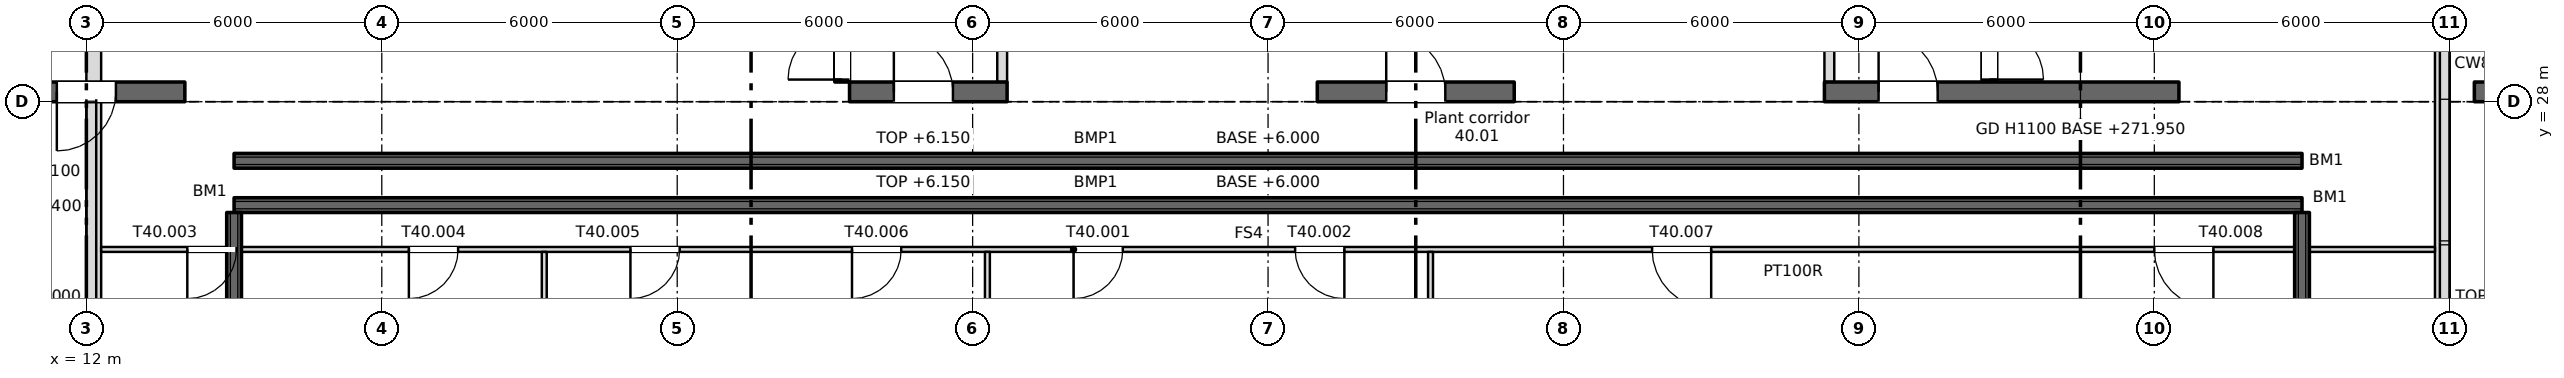
"""IFC4 building model, lengths in metres.
Left out: names, types, materials, properties, quantities, classifications, styles, units other than length and angle.
Written with IfcOpenShell. Run it as: python <this file> out.ifc"""

import sys

from ifc_helpers import new_model, si_unit, direction, frame, frame_2d, origin, place, context, subcontext, project, spatial, rectangle, extrude, element, fill, save


model = new_model("IFC4")
c1 = context("Model", 3, precision=1e-05, world=origin(), true_north=direction((0.0, 1.0)))
c2 = subcontext(c1, "Body", "Model", "MODEL_VIEW")
j1 = project(units=[si_unit("LENGTHUNIT", "METRE"), si_unit("PLANEANGLEUNIT", "RADIAN")], contexts=[c1])
p1 = place(None, origin())
s1 = spatial("IfcSite", under=j1, at=p1, CompositionType="ELEMENT")
p2 = place(p1, origin())
s2 = spatial("IfcBuilding", under=s1, at=p2, CompositionType="ELEMENT")
p3 = place(p2, frame((0.0, 0.0, 271.95)))
s3 = spatial("IfcBuildingStorey", under=s2, at=p3, CompositionType="ELEMENT", Elevation=271.95)
for number, where, z_axis, x_axis in (
    (1, (12.15, 6.3, 6.0), (0.0, 0.0, 1.0), (0.0, 1.0, 0.0)),
    (2, (59.85, 6.3, 6.0), (0.0, 0.0, 1.0), (0.0, 1.0, 0.0)),
):
    element("IfcWall", number, at=place(p3, frame(where, z_axis=z_axis, x_axis=x_axis)), inside=s3, PredefinedType="PARAPET", context=c2, shape_type="SweptSolid", body=[
        extrude(rectangle(XDim=30.4, YDim=0.3, at=frame_2d((15.2, 0.0))), origin(), (0.0, 0.0, 1.0), 1.1),
    ])
for number, where, z_axis, x_axis in (
    (3, (15.0, 26.8, 6.0), (0.0, 0.0, 1.0), (1.0, 0.0, 0.0)),
    (4, (15.0, 25.9, 6.0), (0.0, 0.0, 1.0), (1.0, 0.0, 0.0)),
):
    element("IfcWall", number, at=place(p3, frame(where, z_axis=z_axis, x_axis=x_axis)), inside=s3, PredefinedType="SOLIDWALL", context=c2, shape_type="SweptSolid", body=[
        extrude(rectangle(XDim=42.0, YDim=0.3, at=frame_2d((21.0, 0.0))), origin(), (0.0, 0.0, 1.0), 0.15),
    ])
for number, where, z_axis, x_axis in (
    (5, (15.0, 8.55, 6.0), (0.0, 0.0, 1.0), (0.0, 1.0, 0.0)),
    (6, (57.0, 8.55, 6.0), (0.0, 0.0, 1.0), (0.0, 1.0, 0.0)),
):
    element("IfcWall", number, at=place(p3, frame(where, z_axis=z_axis, x_axis=x_axis)), inside=s3, PredefinedType="SOLIDWALL", context=c2, shape_type="SweptSolid", body=[
        extrude(rectangle(XDim=17.2, YDim=0.3, at=frame_2d((8.6, 0.0))), origin(), (0.0, 0.0, 1.0), 0.15),
    ])
p4 = place(p3, frame((13.85, 28.4, 0.0), z_axis=(0.0, 0.0, 1.0), x_axis=(0.0, 1.0, 0.0)))
e7 = element("IfcWall", 7, at=p4, inside=s3, PredefinedType="SHEAR", context=c2, shape_type="SweptSolid", body=[
    extrude(rectangle(XDim=6.1, YDim=0.3, at=frame_2d((3.05, 0.0))), origin(), (0.0, 0.0, 1.0), 5.5),
])
p5 = place(p3, frame((10.0, 28.2, 0.0), z_axis=(0.0, 0.0, 1.0), x_axis=(1.0, 0.0, 0.0)))
e8 = element("IfcWall", 8, at=p5, inside=s3, PredefinedType="SHEAR", context=c2, shape_type="SweptSolid", body=[
    extrude(rectangle(XDim=4.0, YDim=0.4, at=frame_2d((2.0, 0.0))), origin(), (0.0, 0.0, 1.0), 5.5),
])
p6 = place(p5, frame((1.4, 0.0, 0.0)))
e9 = element("IfcOpeningElement", 9, at=p6, cuts=e8, PredefinedType="OPENING", context=c2, shape_type="SweptSolid", body=[
    extrude(rectangle(XDim=1.2, YDim=2.1, at=frame_2d((0.6, 1.05))), frame((0.0, 0.21, 0.0), z_axis=(0.0, -1.0, 0.0), x_axis=(1.0, 0.0, 0.0)), (0.0, 0.0, 1.0), 0.42),
])
p7 = place(p3, frame((23.65, 28.4, 0.0), z_axis=(0.0, 0.0, 1.0), x_axis=(0.0, 1.0, 0.0)))
e10 = element("IfcWall", 10, at=p7, inside=s3, PredefinedType="SHEAR", context=c2, shape_type="SweptSolid", body=[
    extrude(rectangle(XDim=6.1, YDim=0.3, at=frame_2d((3.05, 0.0))), origin(), (0.0, 0.0, 1.0), 6.0),
])
p8 = place(p3, frame((27.35, 28.4, 0.0), z_axis=(0.0, 0.0, 1.0), x_axis=(0.0, 1.0, 0.0)))
e11 = element("IfcWall", 11, at=p8, inside=s3, PredefinedType="SHEAR", context=c2, shape_type="SweptSolid", body=[
    extrude(rectangle(XDim=6.1, YDim=0.3, at=frame_2d((3.05, 0.0))), origin(), (0.0, 0.0, 1.0), 6.0),
])
p9 = place(p8, frame((0.05, 0.0, 0.0)))
e12 = element("IfcOpeningElement", 12, at=p9, cuts=e11, PredefinedType="OPENING", context=c2, shape_type="SweptSolid", body=[
    extrude(rectangle(XDim=1.1, YDim=2.1, at=frame_2d((0.55, 1.05))), frame((0.0, 0.16, 0.0), z_axis=(0.0, -1.0, 0.0), x_axis=(1.0, 0.0, 0.0)), (0.0, 0.0, 1.0), 0.32),
])
p10 = place(p3, frame((23.5, 28.2, 0.0), z_axis=(0.0, 0.0, 1.0), x_axis=(1.0, 0.0, 0.0)))
e13 = element("IfcWall", 13, at=p10, inside=s3, PredefinedType="SHEAR", context=c2, shape_type="SweptSolid", body=[
    extrude(rectangle(XDim=4.0, YDim=0.4, at=frame_2d((2.0, 0.0))), origin(), (0.0, 0.0, 1.0), 6.0),
])
p11 = place(p3, frame((27.5, 28.2, 0.0), z_axis=(0.0, 0.0, 1.0), x_axis=(1.0, 0.0, 0.0)))
e14 = element("IfcWall", 14, at=p11, inside=s3, PredefinedType="SHEAR", context=c2, shape_type="SweptSolid", body=[
    extrude(rectangle(XDim=3.2, YDim=0.4, at=frame_2d((1.6, 0.0))), origin(), (0.0, 0.0, 1.0), 5.5),
])
p12 = place(p11, frame((0.9, 0.0, 0.0)))
e15 = element("IfcOpeningElement", 15, at=p12, cuts=e14, PredefinedType="OPENING", context=c2, shape_type="SweptSolid", body=[
    extrude(rectangle(XDim=1.2, YDim=2.1, at=frame_2d((0.6, 1.05))), frame((0.0, 0.21, 0.0), z_axis=(0.0, -1.0, 0.0), x_axis=(1.0, 0.0, 0.0)), (0.0, 0.0, 1.0), 0.42),
])
for number, where, z_axis, x_axis in (
    (16, (37.15, 28.4, 0.0), (0.0, 0.0, 1.0), (0.0, 1.0, 0.0)),
    (17, (40.85, 28.4, 0.0), (0.0, 0.0, 1.0), (0.0, 1.0, 0.0)),
):
    element("IfcWall", number, at=place(p3, frame(where, z_axis=z_axis, x_axis=x_axis)), inside=s3, PredefinedType="SHEAR", context=c2, shape_type="SweptSolid", body=[
        extrude(rectangle(XDim=6.1, YDim=0.3, at=frame_2d((3.05, 0.0))), origin(), (0.0, 0.0, 1.0), 6.0),
    ])
p13 = place(p3, frame((37.0, 28.2, 0.0), z_axis=(0.0, 0.0, 1.0), x_axis=(1.0, 0.0, 0.0)))
e18 = element("IfcWall", 18, at=p13, inside=s3, PredefinedType="SHEAR", context=c2, shape_type="SweptSolid", body=[
    extrude(rectangle(XDim=4.0, YDim=0.4, at=frame_2d((2.0, 0.0))), origin(), (0.0, 0.0, 1.0), 6.0),
])
p14 = place(p13, frame((1.4, 0.0, 0.0)))
e19 = element("IfcOpeningElement", 19, at=p14, cuts=e18, PredefinedType="OPENING", context=c2, shape_type="SweptSolid", body=[
    extrude(rectangle(XDim=1.2, YDim=2.1, at=frame_2d((0.6, 1.05))), frame((0.0, 0.21, 0.0), z_axis=(0.0, -1.0, 0.0), x_axis=(1.0, 0.0, 0.0)), (0.0, 0.0, 1.0), 0.42),
])
p15 = place(p3, frame((50.65, 34.5, 0.0), z_axis=(0.0, 0.0, 1.0), x_axis=(0.0, -1.0, 0.0)))
e20 = element("IfcWall", 20, at=p15, inside=s3, PredefinedType="SHEAR", context=c2, shape_type="SweptSolid", body=[
    extrude(rectangle(XDim=6.1, YDim=0.3, at=frame_2d((3.05, 0.0))), origin(), (0.0, 0.0, 1.0), 5.5),
])
p16 = place(p15, frame((4.95, 0.0, 0.0)))
e21 = element("IfcOpeningElement", 21, at=p16, cuts=e20, PredefinedType="OPENING", context=c2, shape_type="SweptSolid", body=[
    extrude(rectangle(XDim=1.1, YDim=2.1, at=frame_2d((0.55, 1.05))), frame((0.0, 0.16, 0.0), z_axis=(0.0, -1.0, 0.0), x_axis=(1.0, 0.0, 0.0)), (0.0, 0.0, 1.0), 0.32),
])
p17 = place(p3, frame((54.35, 28.4, 0.0), z_axis=(0.0, 0.0, 1.0), x_axis=(0.0, 1.0, 0.0)))
e22 = element("IfcWall", 22, at=p17, inside=s3, PredefinedType="SHEAR", context=c2, shape_type="SweptSolid", body=[
    extrude(rectangle(XDim=6.1, YDim=0.3, at=frame_2d((3.05, 0.0))), origin(), (0.0, 0.0, 1.0), 5.5),
])
p18 = place(p3, frame((47.3, 28.2, 0.0), z_axis=(0.0, 0.0, 1.0), x_axis=(1.0, 0.0, 0.0)))
e23 = element("IfcWall", 23, at=p18, inside=s3, PredefinedType="SHEAR", context=c2, shape_type="SweptSolid", body=[
    extrude(rectangle(XDim=7.2, YDim=0.4, at=frame_2d((3.6, 0.0))), origin(), (0.0, 0.0, 1.0), 5.5),
])
p19 = place(p18, frame((1.1, 0.0, 0.0)))
e24 = element("IfcOpeningElement", 24, at=p19, cuts=e23, PredefinedType="OPENING", context=c2, shape_type="SweptSolid", body=[
    extrude(rectangle(XDim=1.2, YDim=2.1, at=frame_2d((0.6, 1.05))), frame((0.0, 0.21, 0.0), z_axis=(0.0, -1.0, 0.0), x_axis=(1.0, 0.0, 0.0)), (0.0, 0.0, 1.0), 0.42),
])
p20 = place(p3, frame((60.65, 28.4, 0.0), z_axis=(0.0, 0.0, 1.0), x_axis=(0.0, 1.0, 0.0)))
e25 = element("IfcWall", 25, at=p20, inside=s3, PredefinedType="SHEAR", context=c2, shape_type="SweptSolid", body=[
    extrude(rectangle(XDim=6.1, YDim=0.3, at=frame_2d((3.05, 0.0))), origin(), (0.0, 0.0, 1.0), 5.2),
])
p21 = place(p3, frame((60.5, 28.2, 0.0), z_axis=(0.0, 0.0, 1.0), x_axis=(1.0, 0.0, 0.0)))
e26 = element("IfcWall", 26, at=p21, inside=s3, PredefinedType="SHEAR", context=c2, shape_type="SweptSolid", body=[
    extrude(rectangle(XDim=4.0, YDim=0.4, at=frame_2d((2.0, 0.0))), origin(), (0.0, 0.0, 1.0), 5.2),
])
p22 = place(p21, frame((1.4, 0.0, 0.0)))
e27 = element("IfcOpeningElement", 27, at=p22, cuts=e26, PredefinedType="OPENING", context=c2, shape_type="SweptSolid", body=[
    extrude(rectangle(XDim=1.2, YDim=2.1, at=frame_2d((0.6, 1.05))), frame((0.0, 0.21, 0.0), z_axis=(0.0, -1.0, 0.0), x_axis=(1.0, 0.0, 0.0)), (0.0, 0.0, 1.0), 0.42),
])
for number, where, z_axis, x_axis in (
    (28, (30.6, 28.4, 0.0), (0.0, 0.0, 1.0), (0.0, 1.0, 0.0)),
    (29, (47.4, 28.4, 0.0), (0.0, 0.0, 1.0), (0.0, 1.0, 0.0)),
):
    element("IfcWall", number, at=place(p3, frame(where, z_axis=z_axis, x_axis=x_axis)), inside=s3, PredefinedType="PARTITIONING", context=c2, shape_type="SweptSolid", body=[
        extrude(rectangle(XDim=6.1, YDim=0.2, at=frame_2d((3.05, 0.0))), origin(), (0.0, 0.0, 1.0), 5.5),
    ])
p23 = place(p3, frame((12.3, 25.0, 0.0), z_axis=(0.0, 0.0, 1.0), x_axis=(1.0, 0.0, 0.0)))
e30 = element("IfcWall", 30, at=p23, inside=s3, PredefinedType="PARTITIONING", context=c2, shape_type="SweptSolid", body=[
    extrude(rectangle(XDim=47.4, YDim=0.1, at=frame_2d((23.7, 0.0))), origin(), (0.0, 0.0, 1.0), 5.4),
])
p24 = place(p23, frame((19.75, 0.0, 0.0)))
e31 = element("IfcOpeningElement", 31, at=p24, cuts=e30, PredefinedType="OPENING", context=c2, shape_type="SweptSolid", body=[
    extrude(rectangle(XDim=1.0, YDim=2.1, at=frame_2d((0.5, 1.05))), frame((0.0, 0.06, 0.0), z_axis=(0.0, -1.0, 0.0), x_axis=(1.0, 0.0, 0.0)), (0.0, 0.0, 1.0), 0.12),
])
p25 = place(p23, frame((24.25, 0.0, 0.0)))
e32 = element("IfcOpeningElement", 32, at=p25, cuts=e30, PredefinedType="OPENING", context=c2, shape_type="SweptSolid", body=[
    extrude(rectangle(XDim=1.0, YDim=2.1, at=frame_2d((0.5, 1.05))), frame((0.0, 0.06, 0.0), z_axis=(0.0, -1.0, 0.0), x_axis=(1.0, 0.0, 0.0)), (0.0, 0.0, 1.0), 0.12),
])
p26 = place(p23, frame((1.75, 0.0, 0.0)))
e33 = element("IfcOpeningElement", 33, at=p26, cuts=e30, PredefinedType="OPENING", context=c2, shape_type="SweptSolid", body=[
    extrude(rectangle(XDim=1.0, YDim=2.1, at=frame_2d((0.5, 1.05))), frame((0.0, 0.06, 0.0), z_axis=(0.0, -1.0, 0.0), x_axis=(1.0, 0.0, 0.0)), (0.0, 0.0, 1.0), 0.12),
])
p27 = place(p23, frame((6.25, 0.0, 0.0)))
e34 = element("IfcOpeningElement", 34, at=p27, cuts=e30, PredefinedType="OPENING", context=c2, shape_type="SweptSolid", body=[
    extrude(rectangle(XDim=1.0, YDim=2.1, at=frame_2d((0.5, 1.05))), frame((0.0, 0.06, 0.0), z_axis=(0.0, -1.0, 0.0), x_axis=(1.0, 0.0, 0.0)), (0.0, 0.0, 1.0), 0.12),
])
p28 = place(p23, frame((10.75, 0.0, 0.0)))
e35 = element("IfcOpeningElement", 35, at=p28, cuts=e30, PredefinedType="OPENING", context=c2, shape_type="SweptSolid", body=[
    extrude(rectangle(XDim=1.0, YDim=2.1, at=frame_2d((0.5, 1.05))), frame((0.0, 0.06, 0.0), z_axis=(0.0, -1.0, 0.0), x_axis=(1.0, 0.0, 0.0)), (0.0, 0.0, 1.0), 0.12),
])
p29 = place(p23, frame((15.25, 0.0, 0.0)))
e36 = element("IfcOpeningElement", 36, at=p29, cuts=e30, PredefinedType="OPENING", context=c2, shape_type="SweptSolid", body=[
    extrude(rectangle(XDim=1.0, YDim=2.1, at=frame_2d((0.5, 1.05))), frame((0.0, 0.06, 0.0), z_axis=(0.0, -1.0, 0.0), x_axis=(1.0, 0.0, 0.0)), (0.0, 0.0, 1.0), 0.12),
])
p30 = place(p23, frame((31.5, 0.0, 0.0)))
e37 = element("IfcOpeningElement", 37, at=p30, cuts=e30, PredefinedType="OPENING", context=c2, shape_type="SweptSolid", body=[
    extrude(rectangle(XDim=1.2, YDim=2.1, at=frame_2d((0.6, 1.05))), frame((0.0, 0.06, 0.0), z_axis=(0.0, -1.0, 0.0), x_axis=(1.0, 0.0, 0.0)), (0.0, 0.0, 1.0), 0.12),
])
p31 = place(p23, frame((41.7, 0.0, 0.0)))
e38 = element("IfcOpeningElement", 38, at=p31, cuts=e30, PredefinedType="OPENING", context=c2, shape_type="SweptSolid", body=[
    extrude(rectangle(XDim=1.2, YDim=2.1, at=frame_2d((0.6, 1.05))), frame((0.0, 0.06, 0.0), z_axis=(0.0, -1.0, 0.0), x_axis=(1.0, 0.0, 0.0)), (0.0, 0.0, 1.0), 0.12),
])
p32 = place(p3, frame((21.3, 6.3, 0.0), z_axis=(0.0, 0.0, 1.0), x_axis=(0.0, 1.0, 0.0)))
e39 = element("IfcWall", 39, at=p32, inside=s3, PredefinedType="PARTITIONING", context=c2, shape_type="SweptSolid", body=[
    extrude(rectangle(XDim=18.65, YDim=0.1, at=frame_2d((9.325, 0.0))), origin(), (0.0, 0.0, 1.0), 5.4),
])
p33 = place(p3, frame((30.3, 19.4, 0.0), z_axis=(0.0, 0.0, 1.0), x_axis=(0.0, 1.0, 0.0)))
e40 = element("IfcWall", 40, at=p33, inside=s3, PredefinedType="PARTITIONING", context=c2, shape_type="SweptSolid", body=[
    extrude(rectangle(XDim=5.55, YDim=0.1, at=frame_2d((2.775, 0.0))), origin(), (0.0, 0.0, 1.0), 5.4),
])
p34 = place(p3, frame((39.3, 6.3, 0.0), z_axis=(0.0, 0.0, 1.0), x_axis=(0.0, 1.0, 0.0)))
e41 = element("IfcWall", 41, at=p34, inside=s3, PredefinedType="PARTITIONING", context=c2, shape_type="SweptSolid", body=[
    extrude(rectangle(XDim=18.65, YDim=0.1, at=frame_2d((9.325, 0.0))), origin(), (0.0, 0.0, 1.0), 5.4),
])
p35 = place(p6, frame((1.2, 0.0, 0.0), z_axis=(0.0, 0.0, 1.0), x_axis=(-1.0, 0.0, 0.0)))
e42 = element("IfcDoor", 42, at=p35, inside=s3, OperationType="SINGLE_SWING_RIGHT", PredefinedType="DOOR", context=c2, shape_type="SweptSolid", body=[
    extrude(rectangle(XDim=1.2, YDim=2.1, at=frame_2d((0.6, 1.05))), frame((0.0, 0.025, 0.0), z_axis=(0.0, -1.0, 0.0), x_axis=(1.0, 0.0, 0.0)), (0.0, 0.0, 1.0), 0.05),
])
fill(e9, e42)
p36 = place(p9, origin())
e43 = element("IfcDoor", 43, at=p36, inside=s3, OperationType="SINGLE_SWING_LEFT", PredefinedType="DOOR", context=c2, shape_type="SweptSolid", body=[
    extrude(rectangle(XDim=1.1, YDim=2.1, at=frame_2d((0.55, 1.05))), frame((0.0, 0.025, 0.0), z_axis=(0.0, -1.0, 0.0), x_axis=(1.0, 0.0, 0.0)), (0.0, 0.0, 1.0), 0.05),
])
fill(e12, e43)
p37 = place(p14, origin())
e44 = element("IfcDoor", 44, at=p37, inside=s3, OperationType="SINGLE_SWING_LEFT", PredefinedType="DOOR", context=c2, shape_type="SweptSolid", body=[
    extrude(rectangle(XDim=1.2, YDim=2.1, at=frame_2d((0.6, 1.05))), frame((0.0, 0.025, 0.0), z_axis=(0.0, -1.0, 0.0), x_axis=(1.0, 0.0, 0.0)), (0.0, 0.0, 1.0), 0.05),
])
fill(e19, e44)
p38 = place(p16, origin())
e45 = element("IfcDoor", 45, at=p38, inside=s3, OperationType="SINGLE_SWING_RIGHT", PredefinedType="DOOR", context=c2, shape_type="SweptSolid", body=[
    extrude(rectangle(XDim=1.1, YDim=2.1, at=frame_2d((0.55, 1.05))), frame((0.0, 0.025, 0.0), z_axis=(0.0, -1.0, 0.0), x_axis=(1.0, 0.0, 0.0)), (0.0, 0.0, 1.0), 0.05),
])
fill(e21, e45)
p39 = place(p12, origin())
e46 = element("IfcDoor", 46, at=p39, inside=s3, OperationType="SINGLE_SWING_LEFT", PredefinedType="DOOR", context=c2, shape_type="SweptSolid", body=[
    extrude(rectangle(XDim=1.2, YDim=2.1, at=frame_2d((0.6, 1.05))), frame((0.0, 0.025, 0.0), z_axis=(0.0, -1.0, 0.0), x_axis=(1.0, 0.0, 0.0)), (0.0, 0.0, 1.0), 0.05),
])
fill(e15, e46)
p40 = place(p19, origin())
e47 = element("IfcDoor", 47, at=p40, inside=s3, OperationType="SINGLE_SWING_LEFT", PredefinedType="DOOR", context=c2, shape_type="SweptSolid", body=[
    extrude(rectangle(XDim=1.2, YDim=2.1, at=frame_2d((0.6, 1.05))), frame((0.0, 0.025, 0.0), z_axis=(0.0, -1.0, 0.0), x_axis=(1.0, 0.0, 0.0)), (0.0, 0.0, 1.0), 0.05),
])
fill(e24, e47)
p41 = place(p24, origin())
e48 = element("IfcDoor", 48, at=p41, inside=s3, OperationType="SINGLE_SWING_LEFT", PredefinedType="DOOR", context=c2, shape_type="SweptSolid", body=[
    extrude(rectangle(XDim=1.0, YDim=2.1, at=frame_2d((0.5, 1.05))), frame((0.0, 0.025, 0.0), z_axis=(0.0, -1.0, 0.0), x_axis=(1.0, 0.0, 0.0)), (0.0, 0.0, 1.0), 0.05),
])
fill(e31, e48)
p42 = place(p25, origin())
e49 = element("IfcDoor", 49, at=p42, inside=s3, OperationType="SINGLE_SWING_RIGHT", PredefinedType="DOOR", context=c2, shape_type="SweptSolid", body=[
    extrude(rectangle(XDim=1.0, YDim=2.1, at=frame_2d((0.5, 1.05))), frame((0.0, 0.025, 0.0), z_axis=(0.0, -1.0, 0.0), x_axis=(1.0, 0.0, 0.0)), (0.0, 0.0, 1.0), 0.05),
])
fill(e32, e49)
p43 = place(p26, origin())
e50 = element("IfcDoor", 50, at=p43, inside=s3, OperationType="SINGLE_SWING_LEFT", PredefinedType="DOOR", context=c2, shape_type="SweptSolid", body=[
    extrude(rectangle(XDim=1.0, YDim=2.1, at=frame_2d((0.5, 1.05))), frame((0.0, 0.025, 0.0), z_axis=(0.0, -1.0, 0.0), x_axis=(1.0, 0.0, 0.0)), (0.0, 0.0, 1.0), 0.05),
])
fill(e33, e50)
p44 = place(p27, origin())
e51 = element("IfcDoor", 51, at=p44, inside=s3, OperationType="SINGLE_SWING_LEFT", PredefinedType="DOOR", context=c2, shape_type="SweptSolid", body=[
    extrude(rectangle(XDim=1.0, YDim=2.1, at=frame_2d((0.5, 1.05))), frame((0.0, 0.025, 0.0), z_axis=(0.0, -1.0, 0.0), x_axis=(1.0, 0.0, 0.0)), (0.0, 0.0, 1.0), 0.05),
])
fill(e34, e51)
p45 = place(p28, origin())
e52 = element("IfcDoor", 52, at=p45, inside=s3, OperationType="SINGLE_SWING_LEFT", PredefinedType="DOOR", context=c2, shape_type="SweptSolid", body=[
    extrude(rectangle(XDim=1.0, YDim=2.1, at=frame_2d((0.5, 1.05))), frame((0.0, 0.025, 0.0), z_axis=(0.0, -1.0, 0.0), x_axis=(1.0, 0.0, 0.0)), (0.0, 0.0, 1.0), 0.05),
])
fill(e35, e52)
p46 = place(p29, origin())
e53 = element("IfcDoor", 53, at=p46, inside=s3, OperationType="SINGLE_SWING_LEFT", PredefinedType="DOOR", context=c2, shape_type="SweptSolid", body=[
    extrude(rectangle(XDim=1.0, YDim=2.1, at=frame_2d((0.5, 1.05))), frame((0.0, 0.025, 0.0), z_axis=(0.0, -1.0, 0.0), x_axis=(1.0, 0.0, 0.0)), (0.0, 0.0, 1.0), 0.05),
])
fill(e36, e53)
p47 = place(p30, origin())
e54 = element("IfcDoor", 54, at=p47, inside=s3, OperationType="SINGLE_SWING_RIGHT", PredefinedType="DOOR", context=c2, shape_type="SweptSolid", body=[
    extrude(rectangle(XDim=1.2, YDim=2.1, at=frame_2d((0.6, 1.05))), frame((0.0, 0.025, 0.0), z_axis=(0.0, -1.0, 0.0), x_axis=(1.0, 0.0, 0.0)), (0.0, 0.0, 1.0), 0.05),
])
fill(e37, e54)
p48 = place(p31, origin())
e55 = element("IfcDoor", 55, at=p48, inside=s3, OperationType="SINGLE_SWING_RIGHT", PredefinedType="DOOR", context=c2, shape_type="SweptSolid", body=[
    extrude(rectangle(XDim=1.2, YDim=2.1, at=frame_2d((0.6, 1.05))), frame((0.0, 0.025, 0.0), z_axis=(0.0, -1.0, 0.0), x_axis=(1.0, 0.0, 0.0)), (0.0, 0.0, 1.0), 0.05),
])
fill(e38, e55)
save(model, sys.argv[1])
